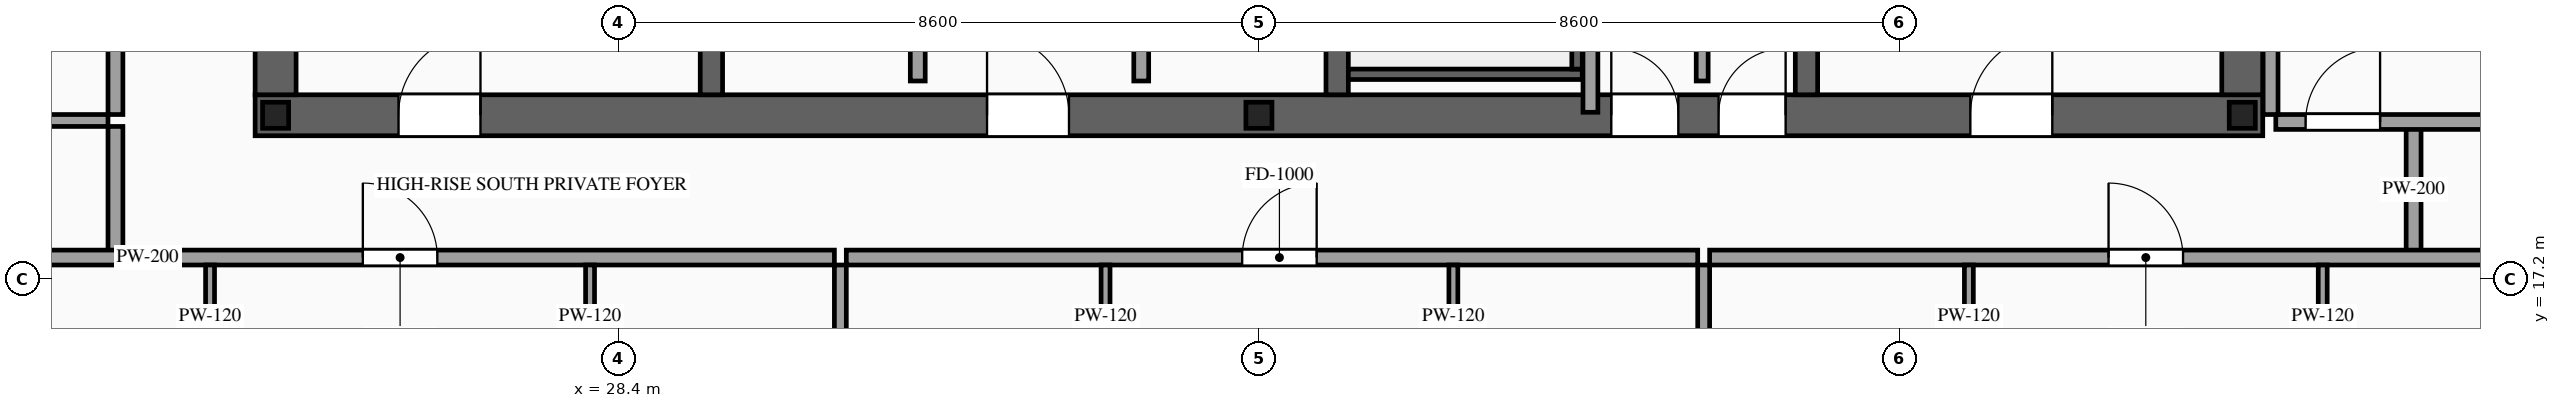
"""IFC4 building model, lengths in metres.
Left out: names, types, materials, properties, quantities, classifications, styles, units other than length and angle.
Written with IfcOpenShell. Run it as: python <this file> out.ifc"""

import sys

from ifc_helpers import new_model, si_unit, direction, frame, frame_2d, origin, origin_2d, place, context, subcontext, project, spatial, rectangle, i_section, extrude, source, transform, mapped, element, fill, save


model = new_model("IFC4")
c1 = context("Model", 3, precision=1e-05, world=origin(), true_north=direction((0.0, 1.0)))
c2 = subcontext(c1, "Body", "Model", "MODEL_VIEW")
j1 = project(units=[si_unit("LENGTHUNIT", "METRE"), si_unit("PLANEANGLEUNIT", "RADIAN")], contexts=[c1])
p1 = place(None, origin())
s1 = spatial("IfcSite", under=j1, at=p1, CompositionType="ELEMENT")
p2 = place(p1, origin())
s2 = spatial("IfcBuilding", under=s1, at=p2, CompositionType="ELEMENT")
p3 = place(p2, frame((0.0, 0.0, 271.6)))
s3 = spatial("IfcBuildingStorey", under=s2, at=p3, CompositionType="ELEMENT", Elevation=271.6)
p4 = place(p3, frame((23.525, 19.4, 0.0), z_axis=(0.0, 0.0, 1.0), x_axis=(1.0, 0.0, 0.0)))
e1 = element("IfcWall", 1, at=p4, inside=s3, PredefinedType="SHEAR", context=c2, shape_type="SweptSolid", body=[
    extrude(rectangle(XDim=26.95, YDim=0.55, at=frame_2d((13.475, 0.0))), origin(), (0.0, 0.0, 1.0), 3.5),
])
p5 = place(p4, frame((1.925, 0.0, 0.0)))
e2 = element("IfcOpeningElement", 2, at=p5, cuts=e1, PredefinedType="OPENING", context=c2, shape_type="SweptSolid", body=[
    extrude(rectangle(XDim=1.1, YDim=2.2, at=frame_2d((0.55, 1.1))), frame((0.0, 0.29, 0.0), z_axis=(0.0, -1.0, 0.0), x_axis=(1.0, 0.0, 0.0)), (0.0, 0.0, 1.0), 0.58),
])
p6 = place(p4, frame((9.825, 0.0, 0.0)))
e3 = element("IfcOpeningElement", 3, at=p6, cuts=e1, PredefinedType="OPENING", context=c2, shape_type="SweptSolid", body=[
    extrude(rectangle(XDim=1.1, YDim=2.2, at=frame_2d((0.55, 1.1))), frame((0.0, 0.29, 0.0), z_axis=(0.0, -1.0, 0.0), x_axis=(1.0, 0.0, 0.0)), (0.0, 0.0, 1.0), 0.58),
])
p7 = place(p4, frame((23.025, 0.0, 0.0)))
e4 = element("IfcOpeningElement", 4, at=p7, cuts=e1, PredefinedType="OPENING", context=c2, shape_type="SweptSolid", body=[
    extrude(rectangle(XDim=1.1, YDim=2.2, at=frame_2d((0.55, 1.1))), frame((0.0, 0.29, 0.0), z_axis=(0.0, -1.0, 0.0), x_axis=(1.0, 0.0, 0.0)), (0.0, 0.0, 1.0), 0.58),
])
p8 = place(p4, frame((19.645, 0.0, 0.0)))
e5 = element("IfcOpeningElement", 5, at=p8, cuts=e1, PredefinedType="OPENING", context=c2, shape_type="SweptSolid", body=[
    extrude(rectangle(XDim=0.9, YDim=2.15, at=frame_2d((0.45, 1.075))), frame((0.0, 0.29, 0.0), z_axis=(0.0, -1.0, 0.0), x_axis=(1.0, 0.0, 0.0)), (0.0, 0.0, 1.0), 0.58),
])
p9 = place(p4, frame((18.205, 0.0, 0.0)))
e6 = element("IfcOpeningElement", 6, at=p9, cuts=e1, PredefinedType="OPENING", context=c2, shape_type="SweptSolid", body=[
    extrude(rectangle(XDim=0.9, YDim=2.15, at=frame_2d((0.45, 1.075))), frame((0.0, 0.29, 0.0), z_axis=(0.0, -1.0, 0.0), x_axis=(1.0, 0.0, 0.0)), (0.0, 0.0, 1.0), 0.58),
])
m1 = source(origin(), c2, "Body", "SweptSolid", [
    extrude(rectangle(XDim=12.25, YDim=0.55, at=frame_2d((6.125, 0.0))), origin(), (0.0, 0.0, 1.0), 3.5),
])
for number, where, z_axis, x_axis in (
    (7, (23.8, 19.675, 0.0), (0.0, 0.0, 1.0), (0.0, 1.0, 0.0)),
    (8, (50.2, 19.675, 0.0), (0.0, 0.0, 1.0), (0.0, 1.0, 0.0)),
):
    element("IfcWall", number, at=place(p3, frame(where, z_axis=z_axis, x_axis=x_axis)), inside=s3, PredefinedType="SHEAR", context=c2, shape_type="MappedRepresentation", body=[
        mapped(m1, transform((0.0, 0.0, 0.0), scale=1.0)),
    ])
m2 = source(origin(), c2, "Body", "SweptSolid", [
    extrude(rectangle(XDim=12.25, YDim=0.3, at=frame_2d((6.125, 0.0))), origin(), (0.0, 0.0, 1.0), 3.5),
])
for number, where, z_axis, x_axis in (
    (9, (29.65, 19.675, 0.0), (0.0, 0.0, 1.0), (0.0, 1.0, 0.0)),
    (10, (38.05, 19.675, 0.0), (0.0, 0.0, 1.0), (0.0, 1.0, 0.0)),
):
    element("IfcWall", number, at=place(p3, frame(where, z_axis=z_axis, x_axis=x_axis)), inside=s3, PredefinedType="SOLIDWALL", context=c2, shape_type="MappedRepresentation", body=[
        mapped(m2, transform((0.0, 0.0, 0.0), scale=1.0)),
    ])
p10 = place(p3, frame((44.35, 19.675, 0.0), z_axis=(0.0, 0.0, 1.0), x_axis=(0.0, 1.0, 0.0)))
e11 = element("IfcWall", 11, at=p10, inside=s3, PredefinedType="SOLIDWALL", context=c2, shape_type="SweptSolid", body=[
    extrude(rectangle(XDim=12.25, YDim=0.3, at=frame_2d((6.125, 0.0))), origin(), (0.0, 0.0, 1.0), 3.5),
])
p11 = place(p10, frame((6.525, 0.0, 0.0)))
e12 = element("IfcOpeningElement", 12, at=p11, cuts=e11, PredefinedType="OPENING", context=c2, shape_type="SweptSolid", body=[
    extrude(rectangle(XDim=1.1, YDim=2.2, at=frame_2d((0.55, 1.1))), frame((0.0, 0.165, 0.0), z_axis=(0.0, -1.0, 0.0), x_axis=(1.0, 0.0, 0.0)), (0.0, 0.0, 1.0), 0.33),
])
p12 = place(p10, frame((8.625, 0.0, 0.0)))
e13 = element("IfcOpeningElement", 13, at=p12, cuts=e11, PredefinedType="OPENING", context=c2, shape_type="SweptSolid", body=[
    extrude(rectangle(XDim=1.1, YDim=2.2, at=frame_2d((0.55, 1.1))), frame((0.0, 0.165, 0.0), z_axis=(0.0, -1.0, 0.0), x_axis=(1.0, 0.0, 0.0)), (0.0, 0.0, 1.0), 0.33),
])
p13 = place(p10, frame((10.725, 0.0, 0.0)))
e14 = element("IfcOpeningElement", 14, at=p13, cuts=e11, PredefinedType="OPENING", context=c2, shape_type="SweptSolid", body=[
    extrude(rectangle(XDim=1.1, YDim=2.2, at=frame_2d((0.55, 1.1))), frame((0.0, 0.165, 0.0), z_axis=(0.0, -1.0, 0.0), x_axis=(1.0, 0.0, 0.0)), (0.0, 0.0, 1.0), 0.33),
])
m3 = source(origin(), c2, "Body", "SweptSolid", [
    extrude(i_section(OverallWidth=0.35, OverallDepth=0.35, WebThickness=0.012, FlangeThickness=0.019, at=origin_2d()), origin(), (0.0, 0.0, 1.0), 3.5),
])
for number, where, z_axis, x_axis in (
    (15, (23.8, 19.4, 0.0), (0.0, 0.0, 1.0), (1.0, 0.0, 0.0)),
    (16, (37.0, 19.4, 0.0), (0.0, 0.0, 1.0), (1.0, 0.0, 0.0)),
    (17, (50.2, 19.4, 0.0), (0.0, 0.0, 1.0), (1.0, 0.0, 0.0)),
):
    element("IfcColumn", number, at=place(p3, frame(where, z_axis=z_axis, x_axis=x_axis)), inside=s3, PredefinedType="COLUMN", context=c2, shape_type="MappedRepresentation", body=[
        mapped(m3, transform((0.0, 0.0, 0.0), scale=1.0)),
    ])
m4 = source(origin(), c2, "Body", "SweptSolid", [
    extrude(rectangle(XDim=3.14, YDim=0.14, at=frame_2d((1.57, 0.0))), origin(), (0.0, 0.0, 1.0), 3.28),
])
p14 = place(p3, frame((38.2, 19.95, 0.0), z_axis=(0.0, 0.0, 1.0), x_axis=(1.0, 0.0, 0.0)))
e18 = element("IfcWall", 18, at=p14, inside=s3, PredefinedType="SOLIDWALL", context=c2, shape_type="MappedRepresentation", body=[
    mapped(m4, transform((0.0, 0.0, 0.0), scale=1.0)),
])
m5 = source(origin(), c2, "Body", "SweptSolid", [
    extrude(rectangle(XDim=8.94, YDim=0.14, at=frame_2d((4.47, 0.0))), origin(), (0.0, 0.0, 1.0), 3.28),
])
p15 = place(p3, frame((41.27, 20.02, 0.0), z_axis=(0.0, 0.0, 1.0), x_axis=(0.0, 1.0, 0.0)))
e19 = element("IfcWall", 19, at=p15, inside=s3, PredefinedType="SOLIDWALL", context=c2, shape_type="MappedRepresentation", body=[
    mapped(m5, transform((0.0, 0.0, 0.0), scale=1.0)),
])
p16 = place(p3, frame((32.42, 19.86, 0.0), z_axis=(0.0, 0.0, 1.0), x_axis=(0.0, 1.0, 0.0)))
e20 = element("IfcWall", 20, at=p16, inside=s3, PredefinedType="PARTITIONING", context=c2, shape_type="SweptSolid", body=[
    extrude(rectangle(XDim=7.94, YDim=0.2, at=frame_2d((3.97, 0.0))), origin(), (0.0, 0.0, 1.0), 3.28),
])
p17 = place(p16, frame((3.52, 0.0, 0.0)))
e21 = element("IfcOpeningElement", 21, at=p17, cuts=e20, PredefinedType="OPENING", context=c2, shape_type="SweptSolid", body=[
    extrude(rectangle(XDim=0.9, YDim=2.15, at=frame_2d((0.45, 1.075))), frame((0.0, 0.115, 0.0), z_axis=(0.0, -1.0, 0.0), x_axis=(1.0, 0.0, 0.0)), (0.0, 0.0, 1.0), 0.23),
])
p18 = place(p3, frame((35.42, 19.86, 0.0), z_axis=(0.0, 0.0, 1.0), x_axis=(0.0, 1.0, 0.0)))
e22 = element("IfcWall", 22, at=p18, inside=s3, PredefinedType="PARTITIONING", context=c2, shape_type="SweptSolid", body=[
    extrude(rectangle(XDim=6.34, YDim=0.2, at=frame_2d((3.17, 0.0))), origin(), (0.0, 0.0, 1.0), 3.28),
])
p19 = place(p18, frame((2.72, 0.0, 0.0)))
e23 = element("IfcOpeningElement", 23, at=p19, cuts=e22, PredefinedType="OPENING", context=c2, shape_type="SweptSolid", body=[
    extrude(rectangle(XDim=0.9, YDim=2.15, at=frame_2d((0.45, 1.075))), frame((0.0, 0.115, 0.0), z_axis=(0.0, -1.0, 0.0), x_axis=(1.0, 0.0, 0.0)), (0.0, 0.0, 1.0), 0.23),
])
m6 = source(origin(), c2, "Body", "SweptSolid", [
    extrude(rectangle(XDim=1.34, YDim=0.16, at=frame_2d((0.67, 0.0))), origin(), (0.0, 0.0, 1.0), 3.28),
])
p20 = place(p3, frame((42.95, 19.86, 0.0), z_axis=(0.0, 0.0, 1.0), x_axis=(0.0, 1.0, 0.0)))
e24 = element("IfcWall", 24, at=p20, inside=s3, PredefinedType="PARTITIONING", context=c2, shape_type="MappedRepresentation", body=[
    mapped(m6, transform((0.0, 0.0, 0.0), scale=1.0)),
])
m7 = source(origin(), c2, "Body", "SweptSolid", [
    extrude(rectangle(XDim=6.06, YDim=0.2, at=frame_2d((3.03, 0.0))), origin(), (0.0, 0.0, 1.0), 3.28),
])
p21 = place(p3, frame((41.45, 19.44, 0.0), z_axis=(0.0, 0.0, 1.0), x_axis=(0.0, 1.0, 0.0)))
e25 = element("IfcWall", 25, at=p21, inside=s3, PredefinedType="PARTITIONING", context=c2, shape_type="MappedRepresentation", body=[
    mapped(m7, transform((0.0, 0.0, 0.0), scale=1.0)),
])
m8 = source(origin(), c2, "Body", "SweptSolid", [
    extrude(rectangle(XDim=1.7, YDim=0.2, at=frame_2d((0.85, 0.0))), origin(), (0.0, 0.0, 1.0), 3.28),
])
for number, where, z_axis, x_axis in (
    (26, (21.65, 17.55, 0.0), (0.0, 0.0, 1.0), (0.0, 1.0, 0.0)),
    (27, (52.5, 17.55, 0.0), (0.0, 0.0, 1.0), (0.0, 1.0, 0.0)),
):
    element("IfcWall", number, at=place(p3, frame(where, z_axis=z_axis, x_axis=x_axis)), inside=s3, PredefinedType="PARTITIONING", context=c2, shape_type="MappedRepresentation", body=[
        mapped(m8, transform((0.0, 0.0, 0.0), scale=1.0)),
    ])
p22 = place(p3, frame((19.44, 17.49, 0.0), z_axis=(0.0, 0.0, 1.0), x_axis=(1.0, 0.0, 0.0)))
e28 = element("IfcWall", 28, at=p22, inside=s3, PredefinedType="PARTITIONING", context=c2, shape_type="SweptSolid", body=[
    extrude(rectangle(XDim=11.861, YDim=0.2, at=frame_2d((5.931, 0.0))), origin(), (0.0, 0.0, 1.0), 3.28),
])
p23 = place(p22, frame((5.531, 0.0, 0.0)))
e29 = element("IfcOpeningElement", 29, at=p23, cuts=e28, PredefinedType="OPENING", context=c2, shape_type="SweptSolid", body=[
    extrude(rectangle(XDim=1.0, YDim=2.2, at=frame_2d((0.5, 1.1))), frame((0.0, 0.115, 0.0), z_axis=(0.0, -1.0, 0.0), x_axis=(1.0, 0.0, 0.0)), (0.0, 0.0, 1.0), 0.23),
])
m9 = source(origin(), c2, "Body", "SweptSolid", [
    extrude(rectangle(XDim=12.04, YDim=0.16, at=frame_2d((6.02, 0.0))), origin(), (0.0, 0.0, 1.0), 3.28),
])
p24 = place(p3, frame((31.381, 5.35, 0.0), z_axis=(0.0, 0.0, 1.0), x_axis=(0.0, 1.0, 0.0)))
e30 = element("IfcWall", 30, at=p24, inside=s3, PredefinedType="PARTITIONING", context=c2, shape_type="MappedRepresentation", body=[
    mapped(m9, transform((0.0, 0.0, 0.0), scale=1.0)),
])
p25 = place(p3, frame((22.92, 13.28, 0.0), z_axis=(0.0, 0.0, 1.0), x_axis=(0.0, 1.0, 0.0)))
e31 = element("IfcWall", 31, at=p25, inside=s3, PredefinedType="PARTITIONING", context=c2, shape_type="SweptSolid", body=[
    extrude(rectangle(XDim=4.11, YDim=0.12, at=frame_2d((2.055, 0.0))), origin(), (0.0, 0.0, 1.0), 3.28),
])
p26 = place(p25, frame((1.63, 0.0, 0.0)))
e32 = element("IfcOpeningElement", 32, at=p26, cuts=e31, PredefinedType="OPENING", context=c2, shape_type="SweptSolid", body=[
    extrude(rectangle(XDim=0.85, YDim=2.1, at=frame_2d((0.425, 1.05))), frame((0.0, 0.075, 0.0), z_axis=(0.0, -1.0, 0.0), x_axis=(1.0, 0.0, 0.0)), (0.0, 0.0, 1.0), 0.15),
])
p27 = place(p3, frame((28.021, 13.28, 0.0), z_axis=(0.0, 0.0, 1.0), x_axis=(0.0, 1.0, 0.0)))
e33 = element("IfcWall", 33, at=p27, inside=s3, PredefinedType="PARTITIONING", context=c2, shape_type="SweptSolid", body=[
    extrude(rectangle(XDim=4.11, YDim=0.12, at=frame_2d((2.055, 0.0))), origin(), (0.0, 0.0, 1.0), 3.28),
])
p28 = place(p27, frame((1.63, 0.0, 0.0)))
e34 = element("IfcOpeningElement", 34, at=p28, cuts=e33, PredefinedType="OPENING", context=c2, shape_type="SweptSolid", body=[
    extrude(rectangle(XDim=0.85, YDim=2.1, at=frame_2d((0.425, 1.05))), frame((0.0, 0.075, 0.0), z_axis=(0.0, -1.0, 0.0), x_axis=(1.0, 0.0, 0.0)), (0.0, 0.0, 1.0), 0.15),
])
p29 = place(p3, frame((31.461, 17.49, 0.0), z_axis=(0.0, 0.0, 1.0), x_axis=(1.0, 0.0, 0.0)))
e35 = element("IfcWall", 35, at=p29, inside=s3, PredefinedType="PARTITIONING", context=c2, shape_type="SweptSolid", body=[
    extrude(rectangle(XDim=11.429, YDim=0.2, at=frame_2d((5.714, 0.0))), origin(), (0.0, 0.0, 1.0), 3.28),
])
p30 = place(p29, frame((5.314, 0.0, 0.0)))
e36 = element("IfcOpeningElement", 36, at=p30, cuts=e35, PredefinedType="OPENING", context=c2, shape_type="SweptSolid", body=[
    extrude(rectangle(XDim=1.0, YDim=2.2, at=frame_2d((0.5, 1.1))), frame((0.0, 0.115, 0.0), z_axis=(0.0, -1.0, 0.0), x_axis=(1.0, 0.0, 0.0)), (0.0, 0.0, 1.0), 0.23),
])
p31 = place(p3, frame((42.97, 5.35, 0.0), z_axis=(0.0, 0.0, 1.0), x_axis=(0.0, 1.0, 0.0)))
e37 = element("IfcWall", 37, at=p31, inside=s3, PredefinedType="PARTITIONING", context=c2, shape_type="MappedRepresentation", body=[
    mapped(m9, transform((0.0, 0.0, 0.0), scale=1.0)),
])
p32 = place(p3, frame((34.941, 13.28, 0.0), z_axis=(0.0, 0.0, 1.0), x_axis=(0.0, 1.0, 0.0)))
e38 = element("IfcWall", 38, at=p32, inside=s3, PredefinedType="PARTITIONING", context=c2, shape_type="SweptSolid", body=[
    extrude(rectangle(XDim=4.11, YDim=0.12, at=frame_2d((2.055, 0.0))), origin(), (0.0, 0.0, 1.0), 3.28),
])
p33 = place(p32, frame((1.63, 0.0, 0.0)))
e39 = element("IfcOpeningElement", 39, at=p33, cuts=e38, PredefinedType="OPENING", context=c2, shape_type="SweptSolid", body=[
    extrude(rectangle(XDim=0.85, YDim=2.1, at=frame_2d((0.425, 1.05))), frame((0.0, 0.075, 0.0), z_axis=(0.0, -1.0, 0.0), x_axis=(1.0, 0.0, 0.0)), (0.0, 0.0, 1.0), 0.15),
])
p34 = place(p3, frame((39.61, 13.28, 0.0), z_axis=(0.0, 0.0, 1.0), x_axis=(0.0, 1.0, 0.0)))
e40 = element("IfcWall", 40, at=p34, inside=s3, PredefinedType="PARTITIONING", context=c2, shape_type="SweptSolid", body=[
    extrude(rectangle(XDim=4.11, YDim=0.12, at=frame_2d((2.055, 0.0))), origin(), (0.0, 0.0, 1.0), 3.28),
])
p35 = place(p34, frame((1.63, 0.0, 0.0)))
e41 = element("IfcOpeningElement", 41, at=p35, cuts=e40, PredefinedType="OPENING", context=c2, shape_type="SweptSolid", body=[
    extrude(rectangle(XDim=0.85, YDim=2.1, at=frame_2d((0.425, 1.05))), frame((0.0, 0.075, 0.0), z_axis=(0.0, -1.0, 0.0), x_axis=(1.0, 0.0, 0.0)), (0.0, 0.0, 1.0), 0.15),
])
p36 = place(p3, frame((43.05, 17.49, 0.0), z_axis=(0.0, 0.0, 1.0), x_axis=(1.0, 0.0, 0.0)))
e42 = element("IfcWall", 42, at=p36, inside=s3, PredefinedType="PARTITIONING", context=c2, shape_type="SweptSolid", body=[
    extrude(rectangle(XDim=11.51, YDim=0.2, at=frame_2d((5.755, 0.0))), origin(), (0.0, 0.0, 1.0), 3.28),
])
p37 = place(p36, frame((5.355, 0.0, 0.0)))
e43 = element("IfcOpeningElement", 43, at=p37, cuts=e42, PredefinedType="OPENING", context=c2, shape_type="SweptSolid", body=[
    extrude(rectangle(XDim=1.0, YDim=2.2, at=frame_2d((0.5, 1.1))), frame((0.0, 0.115, 0.0), z_axis=(0.0, -1.0, 0.0), x_axis=(1.0, 0.0, 0.0)), (0.0, 0.0, 1.0), 0.23),
])
p38 = place(p3, frame((46.53, 13.28, 0.0), z_axis=(0.0, 0.0, 1.0), x_axis=(0.0, 1.0, 0.0)))
e44 = element("IfcWall", 44, at=p38, inside=s3, PredefinedType="PARTITIONING", context=c2, shape_type="SweptSolid", body=[
    extrude(rectangle(XDim=4.11, YDim=0.12, at=frame_2d((2.055, 0.0))), origin(), (0.0, 0.0, 1.0), 3.28),
])
p39 = place(p38, frame((1.63, 0.0, 0.0)))
e45 = element("IfcOpeningElement", 45, at=p39, cuts=e44, PredefinedType="OPENING", context=c2, shape_type="SweptSolid", body=[
    extrude(rectangle(XDim=0.85, YDim=2.1, at=frame_2d((0.425, 1.05))), frame((0.0, 0.075, 0.0), z_axis=(0.0, -1.0, 0.0), x_axis=(1.0, 0.0, 0.0)), (0.0, 0.0, 1.0), 0.15),
])
p40 = place(p3, frame((51.28, 13.28, 0.0), z_axis=(0.0, 0.0, 1.0), x_axis=(0.0, 1.0, 0.0)))
e46 = element("IfcWall", 46, at=p40, inside=s3, PredefinedType="PARTITIONING", context=c2, shape_type="SweptSolid", body=[
    extrude(rectangle(XDim=4.11, YDim=0.12, at=frame_2d((2.055, 0.0))), origin(), (0.0, 0.0, 1.0), 3.28),
])
p41 = place(p40, frame((1.63, 0.0, 0.0)))
e47 = element("IfcOpeningElement", 47, at=p41, cuts=e46, PredefinedType="OPENING", context=c2, shape_type="SweptSolid", body=[
    extrude(rectangle(XDim=0.85, YDim=2.1, at=frame_2d((0.425, 1.05))), frame((0.0, 0.075, 0.0), z_axis=(0.0, -1.0, 0.0), x_axis=(1.0, 0.0, 0.0)), (0.0, 0.0, 1.0), 0.15),
])
p42 = place(p3, frame((21.65, 19.41, 0.0), z_axis=(0.0, 0.0, 1.0), x_axis=(0.0, 1.0, 0.0)))
e48 = element("IfcWall", 48, at=p42, inside=s3, PredefinedType="PARTITIONING", context=c2, shape_type="SweptSolid", body=[
    extrude(rectangle(XDim=12.78, YDim=0.2, at=frame_2d((6.39, 0.0))), origin(), (0.0, 0.0, 1.0), 3.28),
])
p43 = place(p42, frame((5.89, 0.0, 0.0)))
e49 = element("IfcOpeningElement", 49, at=p43, cuts=e48, PredefinedType="OPENING", context=c2, shape_type="SweptSolid", body=[
    extrude(rectangle(XDim=1.0, YDim=2.2, at=frame_2d((0.5, 1.1))), frame((0.0, 0.115, 0.0), z_axis=(0.0, -1.0, 0.0), x_axis=(1.0, 0.0, 0.0)), (0.0, 0.0, 1.0), 0.23),
])
m10 = source(origin(), c2, "Body", "SweptSolid", [
    extrude(rectangle(XDim=5.0, YDim=0.16, at=frame_2d((2.5, 0.0))), origin(), (0.0, 0.0, 1.0), 2.825),
])
p44 = place(p3, frame((16.55, 19.33, 0.0), z_axis=(0.0, 0.0, 1.0), x_axis=(1.0, 0.0, 0.0)))
e50 = element("IfcWall", 50, at=p44, inside=s3, PredefinedType="PARTITIONING", context=c2, shape_type="MappedRepresentation", body=[
    mapped(m10, transform((0.0, 0.0, 0.0), scale=1.0)),
])
p45 = place(p3, frame((50.65, 19.31, 0.0), z_axis=(0.0, 0.0, 1.0), x_axis=(1.0, 0.0, 0.0)))
e51 = element("IfcWall", 51, at=p45, inside=s3, PredefinedType="PARTITIONING", context=c2, shape_type="SweptSolid", body=[
    extrude(rectangle(XDim=6.8, YDim=0.2, at=frame_2d((3.4, 0.0))), origin(), (0.0, 0.0, 1.0), 2.825),
])
p46 = place(p45, frame((0.4, 0.0, 0.0)))
e52 = element("IfcOpeningElement", 52, at=p46, cuts=e51, PredefinedType="OPENING", context=c2, shape_type="SweptSolid", body=[
    extrude(rectangle(XDim=1.0, YDim=2.2, at=frame_2d((0.5, 1.1))), frame((0.0, 0.115, 0.0), z_axis=(0.0, -1.0, 0.0), x_axis=(1.0, 0.0, 0.0)), (0.0, 0.0, 1.0), 0.23),
])
m11 = source(origin(), c2, "Body", "SweptSolid", [
    extrude(rectangle(XDim=12.78, YDim=0.2, at=frame_2d((6.39, 0.0))), origin(), (0.0, 0.0, 1.0), 3.28),
])
p47 = place(p3, frame((50.58, 19.41, 0.0), z_axis=(0.0, 0.0, 1.0), x_axis=(0.0, 1.0, 0.0)))
e53 = element("IfcWall", 53, at=p47, inside=s3, PredefinedType="PARTITIONING", context=c2, shape_type="MappedRepresentation", body=[
    mapped(m11, transform((0.0, 0.0, 0.0), scale=1.0)),
])
m12 = source(origin(), c2, "Body", "SweptSolid", [
    extrude(rectangle(XDim=1.1, YDim=2.2, at=frame_2d((0.55, 1.1))), frame((0.0, 0.025, 0.0), z_axis=(0.0, -1.0, 0.0), x_axis=(1.0, 0.0, 0.0)), (0.0, 0.0, 1.0), 0.05),
])
p48 = place(p5, origin())
e54 = element("IfcDoor", 54, at=p48, inside=s3, OperationType="SINGLE_SWING_RIGHT", PredefinedType="DOOR", context=c2, shape_type="MappedRepresentation", body=[
    mapped(m12, transform((0.0, 0.0, 0.0), scale=1.0)),
])
fill(e2, e54)
p49 = place(p6, origin())
e55 = element("IfcDoor", 55, at=p49, inside=s3, OperationType="SINGLE_SWING_LEFT", PredefinedType="DOOR", context=c2, shape_type="MappedRepresentation", body=[
    mapped(m12, transform((0.0, 0.0, 0.0), scale=1.0)),
])
fill(e3, e55)
p50 = place(p7, origin())
e56 = element("IfcDoor", 56, at=p50, inside=s3, OperationType="SINGLE_SWING_RIGHT", PredefinedType="DOOR", context=c2, shape_type="MappedRepresentation", body=[
    mapped(m12, transform((0.0, 0.0, 0.0), scale=1.0)),
])
fill(e4, e56)
m13 = source(origin(), c2, "Body", "SweptSolid", [
    extrude(rectangle(XDim=0.9, YDim=2.15, at=frame_2d((0.45, 1.075))), frame((0.0, 0.025, 0.0), z_axis=(0.0, -1.0, 0.0), x_axis=(1.0, 0.0, 0.0)), (0.0, 0.0, 1.0), 0.05),
])
p51 = place(p8, origin())
e57 = element("IfcDoor", 57, at=p51, inside=s3, OperationType="SINGLE_SWING_RIGHT", PredefinedType="DOOR", context=c2, shape_type="MappedRepresentation", body=[
    mapped(m13, transform((0.0, 0.0, 0.0), scale=1.0)),
])
fill(e5, e57)
p52 = place(p9, origin())
e58 = element("IfcDoor", 58, at=p52, inside=s3, OperationType="SINGLE_SWING_LEFT", PredefinedType="DOOR", context=c2, shape_type="MappedRepresentation", body=[
    mapped(m13, transform((0.0, 0.0, 0.0), scale=1.0)),
])
fill(e6, e58)
m14 = source(origin(), c2, "Body", "SweptSolid", [
    extrude(rectangle(XDim=1.0, YDim=2.2, at=frame_2d((0.5, 1.1))), frame((0.0, 0.025, 0.0), z_axis=(0.0, -1.0, 0.0), x_axis=(1.0, 0.0, 0.0)), (0.0, 0.0, 1.0), 0.05),
])
p53 = place(p23, origin())
e59 = element("IfcDoor", 59, at=p53, inside=s3, OperationType="SINGLE_SWING_LEFT", PredefinedType="DOOR", context=c2, shape_type="MappedRepresentation", body=[
    mapped(m14, transform((0.0, 0.0, 0.0), scale=1.0)),
])
fill(e29, e59)
p54 = place(p30, origin())
e60 = element("IfcDoor", 60, at=p54, inside=s3, OperationType="SINGLE_SWING_RIGHT", PredefinedType="DOOR", context=c2, shape_type="MappedRepresentation", body=[
    mapped(m14, transform((0.0, 0.0, 0.0), scale=1.0)),
])
fill(e36, e60)
p55 = place(p37, origin())
e61 = element("IfcDoor", 61, at=p55, inside=s3, OperationType="SINGLE_SWING_LEFT", PredefinedType="DOOR", context=c2, shape_type="MappedRepresentation", body=[
    mapped(m14, transform((0.0, 0.0, 0.0), scale=1.0)),
])
fill(e43, e61)
p56 = place(p46, origin())
e62 = element("IfcDoor", 62, at=p56, inside=s3, OperationType="SINGLE_SWING_RIGHT", PredefinedType="DOOR", context=c2, shape_type="MappedRepresentation", body=[
    mapped(m14, transform((0.0, 0.0, 0.0), scale=1.0)),
])
fill(e52, e62)
save(model, sys.argv[1])
